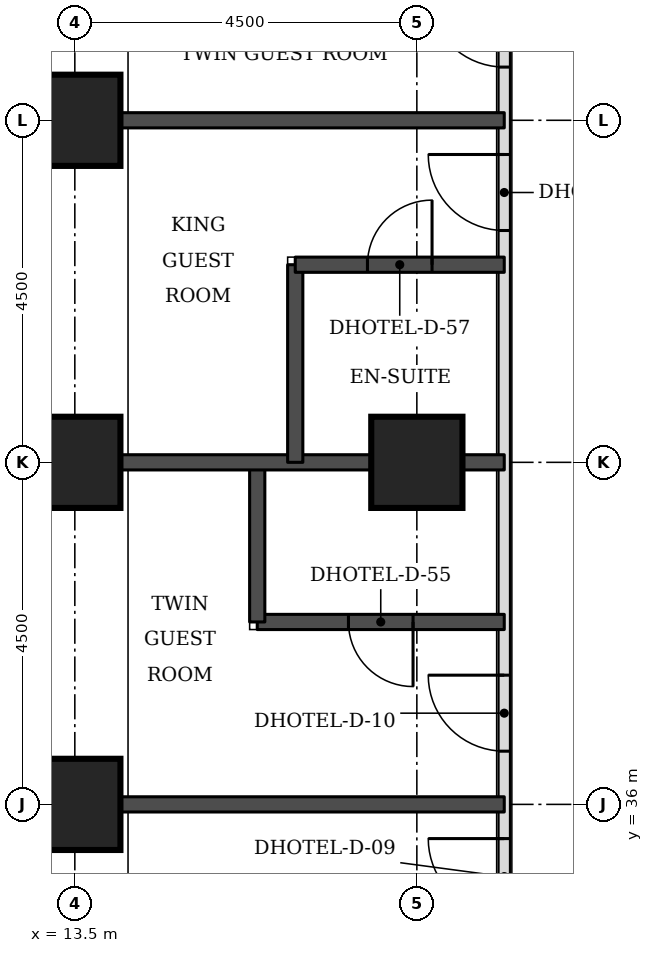
"""IFC4 building model, lengths in metres.
Left out: names, types, materials, properties, quantities, classifications, styles, units other than length and angle.
Written with IfcOpenShell. Run it as: python <this file> out.ifc"""

import sys

from ifc_helpers import new_model, si_unit, direction, frame, frame_2d, origin, origin_2d, place, context, subcontext, project, spatial, rectangle, extrude, element, fill, save


model = new_model("IFC4")
c1 = context("Model", 3, precision=1e-05, world=origin(), true_north=direction((0.0, 1.0)))
c2 = subcontext(c1, "Body", "Model", "MODEL_VIEW")
j1 = project(units=[si_unit("LENGTHUNIT", "METRE"), si_unit("PLANEANGLEUNIT", "RADIAN")], contexts=[c1])
p1 = place(None, origin())
s1 = spatial("IfcSite", under=j1, at=p1, CompositionType="ELEMENT")
p2 = place(p1, origin())
s2 = spatial("IfcBuilding", under=s1, at=p2, CompositionType="ELEMENT")
p3 = place(p2, frame((0.0, 0.0, 36.3)))
s3 = spatial("IfcBuildingStorey", under=s2, at=p3, CompositionType="ELEMENT", Elevation=36.3)
for number, where, z_axis, x_axis in (
    (1, (13.5, 36.0, 0.0), (0.0, 0.0, 1.0), (1.0, 0.0, 0.0)),
    (2, (13.5, 40.5, 0.0), (0.0, 0.0, 1.0), (1.0, 0.0, 0.0)),
    (3, (18.0, 40.5, 0.0), (0.0, 0.0, 1.0), (1.0, 0.0, 0.0)),
    (4, (13.5, 45.0, 0.0), (0.0, 0.0, 1.0), (1.0, 0.0, 0.0)),
):
    element("IfcColumn", number, at=place(p3, frame(where, z_axis=z_axis, x_axis=x_axis)), inside=s3, PredefinedType="COLUMN", context=c2, shape_type="SweptSolid", body=[
        extrude(rectangle(XDim=1.2, YDim=1.2, at=origin_2d()), origin(), (0.0, 0.0, 1.0), 3.3),
    ])
p4 = place(p3, frame((19.15, 25.15, 0.0), z_axis=(0.0, 0.0, 1.0), x_axis=(0.0, 1.0, 0.0)))
e5 = element("IfcWall", 5, at=p4, inside=s3, PredefinedType="PARTITIONING", context=c2, shape_type="SweptSolid", body=[
    extrude(rectangle(XDim=24.35, YDim=0.15, at=frame_2d((12.175, 0.0))), origin(), (0.0, 0.0, 1.0), 3.08),
])
p5 = place(p4, frame((0.4, 0.0, 0.0)))
e6 = element("IfcOpeningElement", 6, at=p5, cuts=e5, PredefinedType="OPENING", context=c2, shape_type="SweptSolid", body=[
    extrude(rectangle(XDim=1.0, YDim=2.1, at=frame_2d((0.5, 1.05))), frame((0.0, 0.085, 0.0), z_axis=(0.0, -1.0, 0.0), x_axis=(1.0, 0.0, 0.0)), (0.0, 0.0, 1.0), 0.17),
])
p6 = place(p4, frame((2.55, 0.0, 0.0)))
e7 = element("IfcOpeningElement", 7, at=p6, cuts=e5, PredefinedType="OPENING", context=c2, shape_type="SweptSolid", body=[
    extrude(rectangle(XDim=1.0, YDim=2.1, at=frame_2d((0.5, 1.05))), frame((0.0, 0.085, 0.0), z_axis=(0.0, -1.0, 0.0), x_axis=(1.0, 0.0, 0.0)), (0.0, 0.0, 1.0), 0.17),
])
p7 = place(p4, frame((9.4, 0.0, 0.0)))
e8 = element("IfcOpeningElement", 8, at=p7, cuts=e5, PredefinedType="OPENING", context=c2, shape_type="SweptSolid", body=[
    extrude(rectangle(XDim=1.0, YDim=2.1, at=frame_2d((0.5, 1.05))), frame((0.0, 0.085, 0.0), z_axis=(0.0, -1.0, 0.0), x_axis=(1.0, 0.0, 0.0)), (0.0, 0.0, 1.0), 0.17),
])
p8 = place(p4, frame((11.55, 0.0, 0.0)))
e9 = element("IfcOpeningElement", 9, at=p8, cuts=e5, PredefinedType="OPENING", context=c2, shape_type="SweptSolid", body=[
    extrude(rectangle(XDim=1.0, YDim=2.1, at=frame_2d((0.5, 1.05))), frame((0.0, 0.085, 0.0), z_axis=(0.0, -1.0, 0.0), x_axis=(1.0, 0.0, 0.0)), (0.0, 0.0, 1.0), 0.17),
])
p9 = place(p4, frame((18.4, 0.0, 0.0)))
e10 = element("IfcOpeningElement", 10, at=p9, cuts=e5, PredefinedType="OPENING", context=c2, shape_type="SweptSolid", body=[
    extrude(rectangle(XDim=1.0, YDim=2.1, at=frame_2d((0.5, 1.05))), frame((0.0, 0.085, 0.0), z_axis=(0.0, -1.0, 0.0), x_axis=(1.0, 0.0, 0.0)), (0.0, 0.0, 1.0), 0.17),
])
p10 = place(p4, frame((20.55, 0.0, 0.0)))
e11 = element("IfcOpeningElement", 11, at=p10, cuts=e5, PredefinedType="OPENING", context=c2, shape_type="SweptSolid", body=[
    extrude(rectangle(XDim=1.0, YDim=2.1, at=frame_2d((0.5, 1.05))), frame((0.0, 0.085, 0.0), z_axis=(0.0, -1.0, 0.0), x_axis=(1.0, 0.0, 0.0)), (0.0, 0.0, 1.0), 0.17),
])
p11 = place(p3, frame((14.1, 36.0, 0.0), z_axis=(0.0, 0.0, 1.0), x_axis=(1.0, 0.0, 0.0)))
e12 = element("IfcWall", 12, at=p11, inside=s3, PredefinedType="SOLIDWALL", context=c2, shape_type="SweptSolid", body=[
    extrude(rectangle(XDim=5.05, YDim=0.2, at=frame_2d((2.525, 0.0))), origin(), (0.0, 0.0, 1.0), 3.08),
])
p12 = place(p3, frame((15.9, 38.4, 0.0), z_axis=(0.0, 0.0, 1.0), x_axis=(1.0, 0.0, 0.0)))
e13 = element("IfcWall", 13, at=p12, inside=s3, PredefinedType="SOLIDWALL", context=c2, shape_type="SweptSolid", body=[
    extrude(rectangle(XDim=3.25, YDim=0.2, at=frame_2d((1.625, 0.0))), origin(), (0.0, 0.0, 1.0), 3.08),
])
p13 = place(p12, frame((1.2, 0.0, 0.0)))
e14 = element("IfcOpeningElement", 14, at=p13, cuts=e13, PredefinedType="OPENING", context=c2, shape_type="SweptSolid", body=[
    extrude(rectangle(XDim=0.85, YDim=2.1, at=frame_2d((0.425, 1.05))), frame((0.0, 0.11, 0.0), z_axis=(0.0, -1.0, 0.0), x_axis=(1.0, 0.0, 0.0)), (0.0, 0.0, 1.0), 0.22),
])
p14 = place(p3, frame((15.9, 38.4, 0.0), z_axis=(0.0, 0.0, 1.0), x_axis=(0.0, 1.0, 0.0)))
e15 = element("IfcWall", 15, at=p14, inside=s3, PredefinedType="SOLIDWALL", context=c2, shape_type="SweptSolid", body=[
    extrude(rectangle(XDim=2.1, YDim=0.2, at=frame_2d((1.05, 0.0))), origin(), (0.0, 0.0, 1.0), 3.08),
])
p15 = place(p3, frame((14.1, 40.5, 0.0), z_axis=(0.0, 0.0, 1.0), x_axis=(1.0, 0.0, 0.0)))
e16 = element("IfcWall", 16, at=p15, inside=s3, PredefinedType="SOLIDWALL", context=c2, shape_type="SweptSolid", body=[
    extrude(rectangle(XDim=5.05, YDim=0.2, at=frame_2d((2.525, 0.0))), origin(), (0.0, 0.0, 1.0), 3.08),
])
p16 = place(p3, frame((16.4, 40.5, 0.0), z_axis=(0.0, 0.0, 1.0), x_axis=(0.0, 1.0, 0.0)))
e17 = element("IfcWall", 17, at=p16, inside=s3, PredefinedType="SOLIDWALL", context=c2, shape_type="SweptSolid", body=[
    extrude(rectangle(XDim=2.6, YDim=0.2, at=frame_2d((1.3, 0.0))), origin(), (0.0, 0.0, 1.0), 3.08),
])
p17 = place(p3, frame((16.4, 43.1, 0.0), z_axis=(0.0, 0.0, 1.0), x_axis=(1.0, 0.0, 0.0)))
e18 = element("IfcWall", 18, at=p17, inside=s3, PredefinedType="SOLIDWALL", context=c2, shape_type="SweptSolid", body=[
    extrude(rectangle(XDim=2.75, YDim=0.2, at=frame_2d((1.375, 0.0))), origin(), (0.0, 0.0, 1.0), 3.08),
])
p18 = place(p17, frame((0.95, 0.0, 0.0)))
e19 = element("IfcOpeningElement", 19, at=p18, cuts=e18, PredefinedType="OPENING", context=c2, shape_type="SweptSolid", body=[
    extrude(rectangle(XDim=0.85, YDim=2.1, at=frame_2d((0.425, 1.05))), frame((0.0, 0.11, 0.0), z_axis=(0.0, -1.0, 0.0), x_axis=(1.0, 0.0, 0.0)), (0.0, 0.0, 1.0), 0.22),
])
p19 = place(p3, frame((14.1, 45.0, 0.0), z_axis=(0.0, 0.0, 1.0), x_axis=(1.0, 0.0, 0.0)))
e20 = element("IfcWall", 20, at=p19, inside=s3, PredefinedType="SOLIDWALL", context=c2, shape_type="SweptSolid", body=[
    extrude(rectangle(XDim=5.05, YDim=0.2, at=frame_2d((2.525, 0.0))), origin(), (0.0, 0.0, 1.0), 3.08),
])
p20 = place(p7, origin())
e21 = element("IfcDoor", 21, at=p20, inside=s3, OperationType="SINGLE_SWING_RIGHT", PredefinedType="DOOR", context=c2, shape_type="SweptSolid", body=[
    extrude(rectangle(XDim=1.0, YDim=2.1, at=frame_2d((0.5, 1.05))), frame((0.0, 0.025, 0.0), z_axis=(0.0, -1.0, 0.0), x_axis=(1.0, 0.0, 0.0)), (0.0, 0.0, 1.0), 0.05),
])
fill(e8, e21)
p21 = place(p8, origin())
e22 = element("IfcDoor", 22, at=p21, inside=s3, OperationType="SINGLE_SWING_RIGHT", PredefinedType="DOOR", context=c2, shape_type="SweptSolid", body=[
    extrude(rectangle(XDim=1.0, YDim=2.1, at=frame_2d((0.5, 1.05))), frame((0.0, 0.025, 0.0), z_axis=(0.0, -1.0, 0.0), x_axis=(1.0, 0.0, 0.0)), (0.0, 0.0, 1.0), 0.05),
])
fill(e9, e22)
p22 = place(p13, frame((0.85, 0.0, 0.0), z_axis=(0.0, 0.0, 1.0), x_axis=(-1.0, 0.0, 0.0)))
e23 = element("IfcDoor", 23, at=p22, inside=s3, OperationType="SINGLE_SWING_LEFT", PredefinedType="DOOR", context=c2, shape_type="SweptSolid", body=[
    extrude(rectangle(XDim=0.85, YDim=2.1, at=frame_2d((0.425, 1.05))), frame((0.0, 0.025, 0.0), z_axis=(0.0, -1.0, 0.0), x_axis=(1.0, 0.0, 0.0)), (0.0, 0.0, 1.0), 0.05),
])
fill(e14, e23)
p23 = place(p9, origin())
e24 = element("IfcDoor", 24, at=p23, inside=s3, OperationType="SINGLE_SWING_RIGHT", PredefinedType="DOOR", context=c2, shape_type="SweptSolid", body=[
    extrude(rectangle(XDim=1.0, YDim=2.1, at=frame_2d((0.5, 1.05))), frame((0.0, 0.025, 0.0), z_axis=(0.0, -1.0, 0.0), x_axis=(1.0, 0.0, 0.0)), (0.0, 0.0, 1.0), 0.05),
])
fill(e10, e24)
p24 = place(p18, origin())
e25 = element("IfcDoor", 25, at=p24, inside=s3, OperationType="SINGLE_SWING_RIGHT", PredefinedType="DOOR", context=c2, shape_type="SweptSolid", body=[
    extrude(rectangle(XDim=0.85, YDim=2.1, at=frame_2d((0.425, 1.05))), frame((0.0, 0.025, 0.0), z_axis=(0.0, -1.0, 0.0), x_axis=(1.0, 0.0, 0.0)), (0.0, 0.0, 1.0), 0.05),
])
fill(e19, e25)
p25 = place(p10, origin())
e26 = element("IfcDoor", 26, at=p25, inside=s3, OperationType="SINGLE_SWING_RIGHT", PredefinedType="DOOR", context=c2, shape_type="SweptSolid", body=[
    extrude(rectangle(XDim=1.0, YDim=2.1, at=frame_2d((0.5, 1.05))), frame((0.0, 0.025, 0.0), z_axis=(0.0, -1.0, 0.0), x_axis=(1.0, 0.0, 0.0)), (0.0, 0.0, 1.0), 0.05),
])
fill(e11, e26)
save(model, sys.argv[1])
